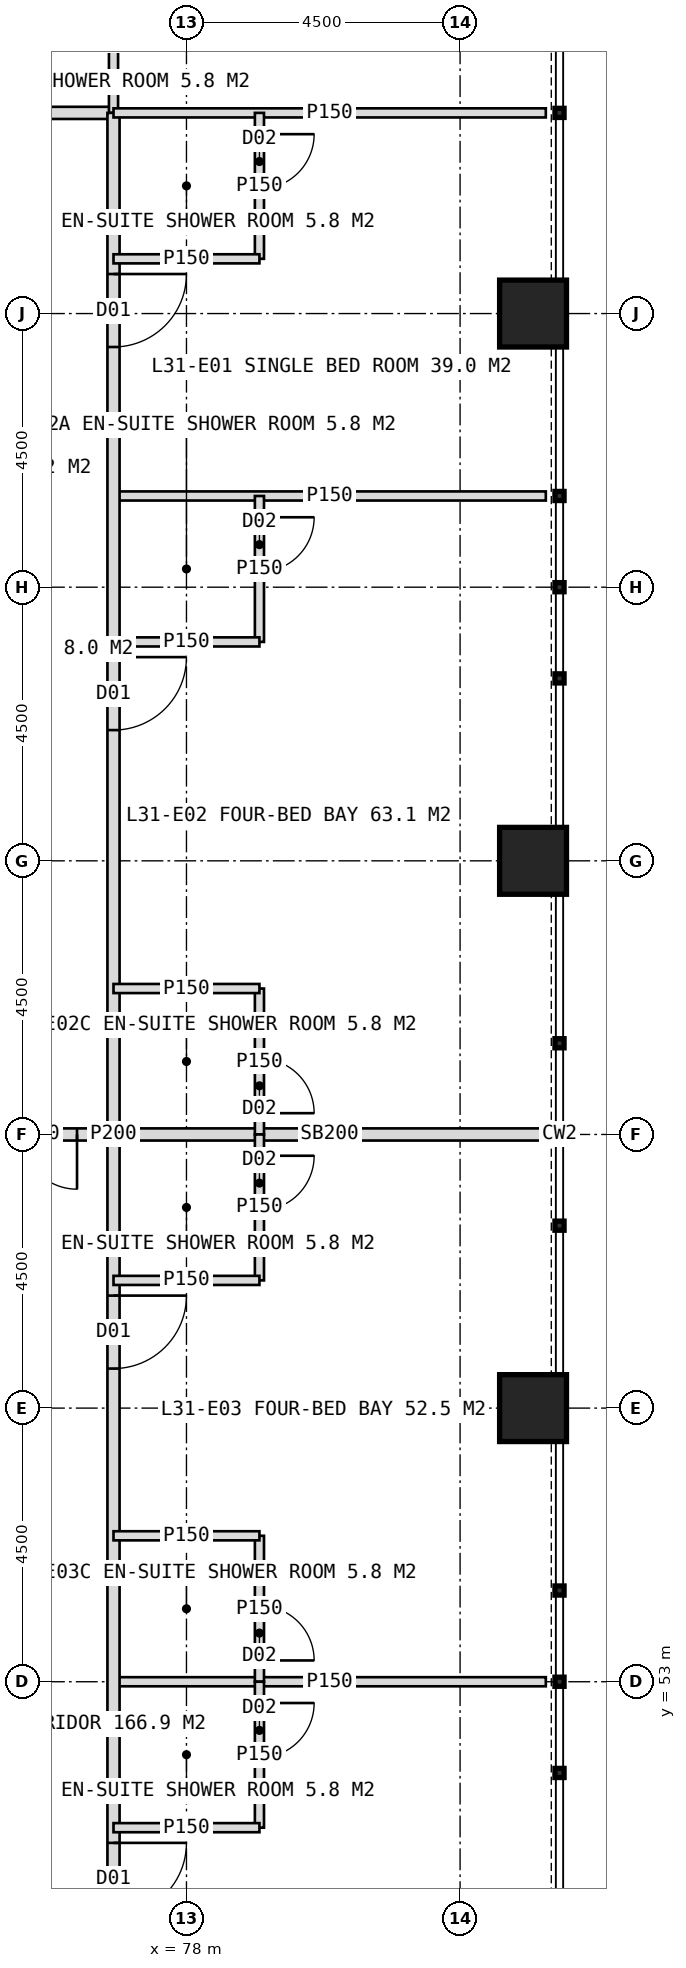
"""IFC4 building model, lengths in metres.
Left out: names, types, materials, properties, quantities, classifications, styles, units other than length and angle.
Written with IfcOpenShell. Run it as: python <this file> out.ifc"""

import sys

from ifc_helpers import new_model, si_unit, direction, frame, frame_2d, origin, origin_2d, place, context, subcontext, project, spatial, rectangle, hollow_rectangle, extrude, element, fill, save


model = new_model("IFC4")
c1 = context("Model", 3, precision=1e-05, world=origin(), true_north=direction((0.0, 1.0)))
c2 = subcontext(c1, "Body", "Model", "MODEL_VIEW")
j1 = project(units=[si_unit("LENGTHUNIT", "METRE"), si_unit("PLANEANGLEUNIT", "RADIAN")], contexts=[c1])
p1 = place(None, origin())
s1 = spatial("IfcSite", under=j1, at=p1, CompositionType="ELEMENT")
p2 = place(p1, origin())
s2 = spatial("IfcBuilding", under=s1, at=p2, CompositionType="ELEMENT")
p3 = place(p2, frame((0.0, 0.0, 132.0)))
s3 = spatial("IfcBuildingStorey", under=s2, at=p3, CompositionType="ELEMENT", Elevation=132.0)
for number, where, z_axis, x_axis in (
    (1, (83.7, 57.5, 0.0), (0.0, 0.0, 1.0), (1.0, 0.0, 0.0)),
    (2, (83.7, 66.5, 0.0), (0.0, 0.0, 1.0), (1.0, 0.0, 0.0)),
    (3, (83.7, 75.5, 0.0), (0.0, 0.0, 1.0), (1.0, 0.0, 0.0)),
):
    element("IfcColumn", number, at=place(p3, frame(where, z_axis=z_axis, x_axis=x_axis)), inside=s3, PredefinedType="COLUMN", context=c2, shape_type="SweptSolid", body=[
        extrude(hollow_rectangle(XDim=1.1, YDim=1.1, WallThickness=0.1, at=origin_2d()), origin(), (0.0, 0.0, 1.0), 4.0),
    ])
p4 = place(p3, frame((43.2, 78.8, 0.0), z_axis=(0.0, 0.0, 1.0), x_axis=(1.0, 0.0, 0.0)))
e4 = element("IfcWall", 4, at=p4, inside=s3, PredefinedType="PARTITIONING", context=c2, shape_type="SweptSolid", body=[
    extrude(rectangle(XDim=33.6, YDim=0.2, at=frame_2d((16.8, 0.0))), origin(), (0.0, 0.0, 1.0), 3.75),
])
p5 = place(p4, frame((3.25, 0.0, 0.0)))
e5 = element("IfcOpeningElement", 5, at=p5, cuts=e4, PredefinedType="OPENING", context=c2, shape_type="SweptSolid", body=[
    extrude(rectangle(XDim=1.2, YDim=2.2, at=frame_2d((0.6, 1.1))), frame((0.0, 0.11, 0.0), z_axis=(0.0, -1.0, 0.0), x_axis=(1.0, 0.0, 0.0)), (0.0, 0.0, 1.0), 0.22),
])
p6 = place(p4, frame((12.55, 0.0, 0.0)))
e6 = element("IfcOpeningElement", 6, at=p6, cuts=e4, PredefinedType="OPENING", context=c2, shape_type="SweptSolid", body=[
    extrude(rectangle(XDim=1.2, YDim=2.2, at=frame_2d((0.6, 1.1))), frame((0.0, 0.11, 0.0), z_axis=(0.0, -1.0, 0.0), x_axis=(1.0, 0.0, 0.0)), (0.0, 0.0, 1.0), 0.22),
])
p7 = place(p4, frame((26.95, 0.0, 0.0)))
e7 = element("IfcOpeningElement", 7, at=p7, cuts=e4, PredefinedType="OPENING", context=c2, shape_type="SweptSolid", body=[
    extrude(rectangle(XDim=1.2, YDim=2.2, at=frame_2d((0.6, 1.1))), frame((0.0, 0.11, 0.0), z_axis=(0.0, -1.0, 0.0), x_axis=(1.0, 0.0, 0.0)), (0.0, 0.0, 1.0), 0.22),
])
p8 = place(p3, frame((76.8, 78.8, 0.0), z_axis=(0.0, 0.0, 1.0), x_axis=(0.0, 1.0, 0.0)))
e8 = element("IfcWall", 8, at=p8, inside=s3, PredefinedType="PARTITIONING", context=c2, shape_type="SweptSolid", body=[
    extrude(rectangle(XDim=2.4, YDim=0.15, at=frame_2d((1.2, 0.0))), origin(), (0.0, 0.0, 1.0), 3.75),
])
p9 = place(p3, frame((76.8, 72.5, 0.0), z_axis=(0.0, 0.0, 1.0), x_axis=(1.0, 0.0, 0.0)))
e9 = element("IfcWall", 9, at=p9, inside=s3, PredefinedType="PARTITIONING", context=c2, shape_type="SweptSolid", body=[
    extrude(rectangle(XDim=7.11, YDim=0.15, at=frame_2d((3.555, 0.0))), origin(), (0.0, 0.0, 1.0), 3.75),
])
p10 = place(p3, frame((76.8, 62.0, 0.0), z_axis=(0.0, 0.0, 1.0), x_axis=(1.0, 0.0, 0.0)))
e10 = element("IfcWall", 10, at=p10, inside=s3, PredefinedType="SOLIDWALL", context=c2, shape_type="SweptSolid", body=[
    extrude(rectangle(XDim=7.11, YDim=0.2, at=frame_2d((3.555, 0.0))), origin(), (0.0, 0.0, 1.0), 2.95),
])
p11 = place(p3, frame((76.8, 53.0, 0.0), z_axis=(0.0, 0.0, 1.0), x_axis=(1.0, 0.0, 0.0)))
e11 = element("IfcWall", 11, at=p11, inside=s3, PredefinedType="PARTITIONING", context=c2, shape_type="SweptSolid", body=[
    extrude(rectangle(XDim=7.11, YDim=0.15, at=frame_2d((3.555, 0.0))), origin(), (0.0, 0.0, 1.0), 3.75),
])
p12 = place(p3, frame((76.8, 78.8, 0.0), z_axis=(0.0, 0.0, 1.0), x_axis=(0.0, -1.0, 0.0)))
e12 = element("IfcWall", 12, at=p12, inside=s3, PredefinedType="PARTITIONING", context=c2, shape_type="SweptSolid", body=[
    extrude(rectangle(XDim=33.6, YDim=0.2, at=frame_2d((16.8, 0.0))), origin(), (0.0, 0.0, 1.0), 3.75),
])
p13 = place(p12, frame((2.65, 0.0, 0.0)))
e13 = element("IfcOpeningElement", 13, at=p13, cuts=e12, PredefinedType="OPENING", context=c2, shape_type="SweptSolid", body=[
    extrude(rectangle(XDim=1.2, YDim=2.2, at=frame_2d((0.6, 1.1))), frame((0.0, 0.11, 0.0), z_axis=(0.0, -1.0, 0.0), x_axis=(1.0, 0.0, 0.0)), (0.0, 0.0, 1.0), 0.22),
])
p14 = place(p12, frame((8.95, 0.0, 0.0)))
e14 = element("IfcOpeningElement", 14, at=p14, cuts=e12, PredefinedType="OPENING", context=c2, shape_type="SweptSolid", body=[
    extrude(rectangle(XDim=1.2, YDim=2.2, at=frame_2d((0.6, 1.1))), frame((0.0, 0.11, 0.0), z_axis=(0.0, -1.0, 0.0), x_axis=(1.0, 0.0, 0.0)), (0.0, 0.0, 1.0), 0.22),
])
p15 = place(p12, frame((19.45, 0.0, 0.0)))
e15 = element("IfcOpeningElement", 15, at=p15, cuts=e12, PredefinedType="OPENING", context=c2, shape_type="SweptSolid", body=[
    extrude(rectangle(XDim=1.2, YDim=2.2, at=frame_2d((0.6, 1.1))), frame((0.0, 0.11, 0.0), z_axis=(0.0, -1.0, 0.0), x_axis=(1.0, 0.0, 0.0)), (0.0, 0.0, 1.0), 0.22),
])
p16 = place(p12, frame((28.45, 0.0, 0.0)))
e16 = element("IfcOpeningElement", 16, at=p16, cuts=e12, PredefinedType="OPENING", context=c2, shape_type="SweptSolid", body=[
    extrude(rectangle(XDim=1.2, YDim=2.2, at=frame_2d((0.6, 1.1))), frame((0.0, 0.11, 0.0), z_axis=(0.0, -1.0, 0.0), x_axis=(1.0, 0.0, 0.0)), (0.0, 0.0, 1.0), 0.22),
])
p17 = place(p3, frame((76.8, 78.8, 0.0), z_axis=(0.0, 0.0, 1.0), x_axis=(1.0, 0.0, 0.0)))
e17 = element("IfcWall", 17, at=p17, inside=s3, PredefinedType="PARTITIONING", context=c2, shape_type="SweptSolid", body=[
    extrude(rectangle(XDim=7.11, YDim=0.15, at=frame_2d((3.555, 0.0))), origin(), (0.0, 0.0, 1.0), 3.75),
])
p18 = place(p3, frame((79.2, 78.8, 0.0), z_axis=(0.0, 0.0, 1.0), x_axis=(0.0, -1.0, 0.0)))
e18 = element("IfcWall", 18, at=p18, inside=s3, PredefinedType="PARTITIONING", context=c2, shape_type="SweptSolid", body=[
    extrude(rectangle(XDim=2.4, YDim=0.15, at=frame_2d((1.2, 0.0))), origin(), (0.0, 0.0, 1.0), 2.997),
])
p19 = place(p18, frame((0.35, 0.0, 0.0)))
e19 = element("IfcOpeningElement", 19, at=p19, cuts=e18, PredefinedType="OPENING", context=c2, shape_type="SweptSolid", body=[
    extrude(rectangle(XDim=0.9, YDim=2.1, at=frame_2d((0.45, 1.05))), frame((0.0, 0.085, 0.0), z_axis=(0.0, -1.0, 0.0), x_axis=(1.0, 0.0, 0.0)), (0.0, 0.0, 1.0), 0.17),
])
p20 = place(p3, frame((76.8, 76.4, 0.0), z_axis=(0.0, 0.0, 1.0), x_axis=(1.0, 0.0, 0.0)))
e20 = element("IfcWall", 20, at=p20, inside=s3, PredefinedType="PARTITIONING", context=c2, shape_type="SweptSolid", body=[
    extrude(rectangle(XDim=2.4, YDim=0.15, at=frame_2d((1.2, 0.0))), origin(), (0.0, 0.0, 1.0), 3.75),
])
p21 = place(p3, frame((79.2, 72.5, 0.0), z_axis=(0.0, 0.0, 1.0), x_axis=(0.0, -1.0, 0.0)))
e21 = element("IfcWall", 21, at=p21, inside=s3, PredefinedType="PARTITIONING", context=c2, shape_type="SweptSolid", body=[
    extrude(rectangle(XDim=2.4, YDim=0.15, at=frame_2d((1.2, 0.0))), origin(), (0.0, 0.0, 1.0), 3.75),
])
p22 = place(p21, frame((0.35, 0.0, 0.0)))
e22 = element("IfcOpeningElement", 22, at=p22, cuts=e21, PredefinedType="OPENING", context=c2, shape_type="SweptSolid", body=[
    extrude(rectangle(XDim=0.9, YDim=2.1, at=frame_2d((0.45, 1.05))), frame((0.0, 0.085, 0.0), z_axis=(0.0, -1.0, 0.0), x_axis=(1.0, 0.0, 0.0)), (0.0, 0.0, 1.0), 0.17),
])
p23 = place(p3, frame((76.8, 70.1, 0.0), z_axis=(0.0, 0.0, 1.0), x_axis=(1.0, 0.0, 0.0)))
e23 = element("IfcWall", 23, at=p23, inside=s3, PredefinedType="PARTITIONING", context=c2, shape_type="SweptSolid", body=[
    extrude(rectangle(XDim=2.4, YDim=0.15, at=frame_2d((1.2, 0.0))), origin(), (0.0, 0.0, 1.0), 3.75),
])
p24 = place(p3, frame((79.2, 64.4, 0.0), z_axis=(0.0, 0.0, 1.0), x_axis=(0.0, -1.0, 0.0)))
e24 = element("IfcWall", 24, at=p24, inside=s3, PredefinedType="PARTITIONING", context=c2, shape_type="SweptSolid", body=[
    extrude(rectangle(XDim=2.4, YDim=0.15, at=frame_2d((1.2, 0.0))), origin(), (0.0, 0.0, 1.0), 3.75),
])
p25 = place(p24, frame((1.15, 0.0, 0.0)))
e25 = element("IfcOpeningElement", 25, at=p25, cuts=e24, PredefinedType="OPENING", context=c2, shape_type="SweptSolid", body=[
    extrude(rectangle(XDim=0.9, YDim=2.1, at=frame_2d((0.45, 1.05))), frame((0.0, 0.085, 0.0), z_axis=(0.0, -1.0, 0.0), x_axis=(1.0, 0.0, 0.0)), (0.0, 0.0, 1.0), 0.17),
])
p26 = place(p3, frame((76.8, 64.4, 0.0), z_axis=(0.0, 0.0, 1.0), x_axis=(1.0, 0.0, 0.0)))
e26 = element("IfcWall", 26, at=p26, inside=s3, PredefinedType="PARTITIONING", context=c2, shape_type="SweptSolid", body=[
    extrude(rectangle(XDim=2.4, YDim=0.15, at=frame_2d((1.2, 0.0))), origin(), (0.0, 0.0, 1.0), 3.75),
])
p27 = place(p3, frame((79.2, 62.0, 0.0), z_axis=(0.0, 0.0, 1.0), x_axis=(0.0, -1.0, 0.0)))
e27 = element("IfcWall", 27, at=p27, inside=s3, PredefinedType="PARTITIONING", context=c2, shape_type="SweptSolid", body=[
    extrude(rectangle(XDim=2.4, YDim=0.15, at=frame_2d((1.2, 0.0))), origin(), (0.0, 0.0, 1.0), 3.75),
])
p28 = place(p27, frame((0.35, 0.0, 0.0)))
e28 = element("IfcOpeningElement", 28, at=p28, cuts=e27, PredefinedType="OPENING", context=c2, shape_type="SweptSolid", body=[
    extrude(rectangle(XDim=0.9, YDim=2.1, at=frame_2d((0.45, 1.05))), frame((0.0, 0.085, 0.0), z_axis=(0.0, -1.0, 0.0), x_axis=(1.0, 0.0, 0.0)), (0.0, 0.0, 1.0), 0.17),
])
p29 = place(p3, frame((76.8, 59.6, 0.0), z_axis=(0.0, 0.0, 1.0), x_axis=(1.0, 0.0, 0.0)))
e29 = element("IfcWall", 29, at=p29, inside=s3, PredefinedType="PARTITIONING", context=c2, shape_type="SweptSolid", body=[
    extrude(rectangle(XDim=2.4, YDim=0.15, at=frame_2d((1.2, 0.0))), origin(), (0.0, 0.0, 1.0), 3.75),
])
p30 = place(p3, frame((79.2, 55.4, 0.0), z_axis=(0.0, 0.0, 1.0), x_axis=(0.0, -1.0, 0.0)))
e30 = element("IfcWall", 30, at=p30, inside=s3, PredefinedType="PARTITIONING", context=c2, shape_type="SweptSolid", body=[
    extrude(rectangle(XDim=2.4, YDim=0.15, at=frame_2d((1.2, 0.0))), origin(), (0.0, 0.0, 1.0), 3.75),
])
p31 = place(p30, frame((1.15, 0.0, 0.0)))
e31 = element("IfcOpeningElement", 31, at=p31, cuts=e30, PredefinedType="OPENING", context=c2, shape_type="SweptSolid", body=[
    extrude(rectangle(XDim=0.9, YDim=2.1, at=frame_2d((0.45, 1.05))), frame((0.0, 0.085, 0.0), z_axis=(0.0, -1.0, 0.0), x_axis=(1.0, 0.0, 0.0)), (0.0, 0.0, 1.0), 0.17),
])
p32 = place(p3, frame((76.8, 55.4, 0.0), z_axis=(0.0, 0.0, 1.0), x_axis=(1.0, 0.0, 0.0)))
e32 = element("IfcWall", 32, at=p32, inside=s3, PredefinedType="PARTITIONING", context=c2, shape_type="SweptSolid", body=[
    extrude(rectangle(XDim=2.4, YDim=0.15, at=frame_2d((1.2, 0.0))), origin(), (0.0, 0.0, 1.0), 3.75),
])
p33 = place(p3, frame((79.2, 53.0, 0.0), z_axis=(0.0, 0.0, 1.0), x_axis=(0.0, -1.0, 0.0)))
e33 = element("IfcWall", 33, at=p33, inside=s3, PredefinedType="PARTITIONING", context=c2, shape_type="SweptSolid", body=[
    extrude(rectangle(XDim=2.4, YDim=0.15, at=frame_2d((1.2, 0.0))), origin(), (0.0, 0.0, 1.0), 3.75),
])
p34 = place(p33, frame((0.35, 0.0, 0.0)))
e34 = element("IfcOpeningElement", 34, at=p34, cuts=e33, PredefinedType="OPENING", context=c2, shape_type="SweptSolid", body=[
    extrude(rectangle(XDim=0.9, YDim=2.1, at=frame_2d((0.45, 1.05))), frame((0.0, 0.085, 0.0), z_axis=(0.0, -1.0, 0.0), x_axis=(1.0, 0.0, 0.0)), (0.0, 0.0, 1.0), 0.17),
])
p35 = place(p3, frame((76.8, 50.6, 0.0), z_axis=(0.0, 0.0, 1.0), x_axis=(1.0, 0.0, 0.0)))
e35 = element("IfcWall", 35, at=p35, inside=s3, PredefinedType="PARTITIONING", context=c2, shape_type="SweptSolid", body=[
    extrude(rectangle(XDim=2.4, YDim=0.15, at=frame_2d((1.2, 0.0))), origin(), (0.0, 0.0, 1.0), 3.75),
])
p36 = place(p3, frame((74.1, 62.0, 0.0), z_axis=(0.0, 0.0, 1.0), x_axis=(1.0, 0.0, 0.0)))
e36 = element("IfcWall", 36, at=p36, inside=s3, PredefinedType="SOLIDWALL", context=c2, shape_type="SweptSolid", body=[
    extrude(rectangle(XDim=2.7, YDim=0.2, at=frame_2d((1.35, 0.0))), origin(), (0.0, 0.0, 1.0), 2.95),
])
p37 = place(p36, frame((0.3, 0.0, 0.0)))
e37 = element("IfcOpeningElement", 37, at=p37, cuts=e36, PredefinedType="OPENING", context=c2, shape_type="SweptSolid", body=[
    extrude(rectangle(XDim=1.8, YDim=2.2, at=frame_2d((0.9, 1.1))), frame((0.0, 0.11, 0.0), z_axis=(0.0, -1.0, 0.0), x_axis=(1.0, 0.0, 0.0)), (0.0, 0.0, 1.0), 0.22),
])
p38 = place(p13, origin())
e38 = element("IfcDoor", 38, at=p38, inside=s3, OperationType="SINGLE_SWING_LEFT", PredefinedType="DOOR", context=c2, shape_type="SweptSolid", body=[
    extrude(rectangle(XDim=1.2, YDim=2.2, at=frame_2d((0.6, 1.1))), frame((0.0, 0.025, 0.0), z_axis=(0.0, -1.0, 0.0), x_axis=(1.0, 0.0, 0.0)), (0.0, 0.0, 1.0), 0.05),
])
fill(e13, e38)
p39 = place(p19, origin())
e39 = element("IfcDoor", 39, at=p39, inside=s3, OperationType="SINGLE_SWING_LEFT", PredefinedType="DOOR", context=c2, shape_type="SweptSolid", body=[
    extrude(rectangle(XDim=0.9, YDim=2.1, at=frame_2d((0.45, 1.05))), frame((0.0, 0.025, 0.0), z_axis=(0.0, -1.0, 0.0), x_axis=(1.0, 0.0, 0.0)), (0.0, 0.0, 1.0), 0.05),
])
fill(e19, e39)
p40 = place(p14, origin())
e40 = element("IfcDoor", 40, at=p40, inside=s3, OperationType="SINGLE_SWING_LEFT", PredefinedType="DOOR", context=c2, shape_type="SweptSolid", body=[
    extrude(rectangle(XDim=1.2, YDim=2.2, at=frame_2d((0.6, 1.1))), frame((0.0, 0.025, 0.0), z_axis=(0.0, -1.0, 0.0), x_axis=(1.0, 0.0, 0.0)), (0.0, 0.0, 1.0), 0.05),
])
fill(e14, e40)
p41 = place(p22, origin())
e41 = element("IfcDoor", 41, at=p41, inside=s3, OperationType="SINGLE_SWING_LEFT", PredefinedType="DOOR", context=c2, shape_type="SweptSolid", body=[
    extrude(rectangle(XDim=0.9, YDim=2.1, at=frame_2d((0.45, 1.05))), frame((0.0, 0.025, 0.0), z_axis=(0.0, -1.0, 0.0), x_axis=(1.0, 0.0, 0.0)), (0.0, 0.0, 1.0), 0.05),
])
fill(e22, e41)
p42 = place(p25, origin())
e42 = element("IfcDoor", 42, at=p42, inside=s3, OperationType="SINGLE_SWING_RIGHT", PredefinedType="DOOR", context=c2, shape_type="SweptSolid", body=[
    extrude(rectangle(XDim=0.9, YDim=2.1, at=frame_2d((0.45, 1.05))), frame((0.0, 0.025, 0.0), z_axis=(0.0, -1.0, 0.0), x_axis=(1.0, 0.0, 0.0)), (0.0, 0.0, 1.0), 0.05),
])
fill(e25, e42)
p43 = place(p15, origin())
e43 = element("IfcDoor", 43, at=p43, inside=s3, OperationType="SINGLE_SWING_LEFT", PredefinedType="DOOR", context=c2, shape_type="SweptSolid", body=[
    extrude(rectangle(XDim=1.2, YDim=2.2, at=frame_2d((0.6, 1.1))), frame((0.0, 0.025, 0.0), z_axis=(0.0, -1.0, 0.0), x_axis=(1.0, 0.0, 0.0)), (0.0, 0.0, 1.0), 0.05),
])
fill(e15, e43)
p44 = place(p28, origin())
e44 = element("IfcDoor", 44, at=p44, inside=s3, OperationType="SINGLE_SWING_LEFT", PredefinedType="DOOR", context=c2, shape_type="SweptSolid", body=[
    extrude(rectangle(XDim=0.9, YDim=2.1, at=frame_2d((0.45, 1.05))), frame((0.0, 0.025, 0.0), z_axis=(0.0, -1.0, 0.0), x_axis=(1.0, 0.0, 0.0)), (0.0, 0.0, 1.0), 0.05),
])
fill(e28, e44)
p45 = place(p31, origin())
e45 = element("IfcDoor", 45, at=p45, inside=s3, OperationType="SINGLE_SWING_RIGHT", PredefinedType="DOOR", context=c2, shape_type="SweptSolid", body=[
    extrude(rectangle(XDim=0.9, YDim=2.1, at=frame_2d((0.45, 1.05))), frame((0.0, 0.025, 0.0), z_axis=(0.0, -1.0, 0.0), x_axis=(1.0, 0.0, 0.0)), (0.0, 0.0, 1.0), 0.05),
])
fill(e31, e45)
p46 = place(p16, origin())
e46 = element("IfcDoor", 46, at=p46, inside=s3, OperationType="SINGLE_SWING_LEFT", PredefinedType="DOOR", context=c2, shape_type="SweptSolid", body=[
    extrude(rectangle(XDim=1.2, YDim=2.2, at=frame_2d((0.6, 1.1))), frame((0.0, 0.025, 0.0), z_axis=(0.0, -1.0, 0.0), x_axis=(1.0, 0.0, 0.0)), (0.0, 0.0, 1.0), 0.05),
])
fill(e16, e46)
p47 = place(p34, origin())
e47 = element("IfcDoor", 47, at=p47, inside=s3, OperationType="SINGLE_SWING_LEFT", PredefinedType="DOOR", context=c2, shape_type="SweptSolid", body=[
    extrude(rectangle(XDim=0.9, YDim=2.1, at=frame_2d((0.45, 1.05))), frame((0.0, 0.025, 0.0), z_axis=(0.0, -1.0, 0.0), x_axis=(1.0, 0.0, 0.0)), (0.0, 0.0, 1.0), 0.05),
])
fill(e34, e47)
p48 = place(p37, origin())
e48 = element("IfcDoor", 48, at=p48, inside=s3, OperationType="DOUBLE_DOOR_DOUBLE_SWING", PredefinedType="DOOR", context=c2, shape_type="SweptSolid", body=[
    extrude(rectangle(XDim=1.8, YDim=2.2, at=frame_2d((0.9, 1.1))), frame((0.0, 0.025, 0.0), z_axis=(0.0, -1.0, 0.0), x_axis=(1.0, 0.0, 0.0)), (0.0, 0.0, 1.0), 0.05),
])
fill(e37, e48)
save(model, sys.argv[1])
